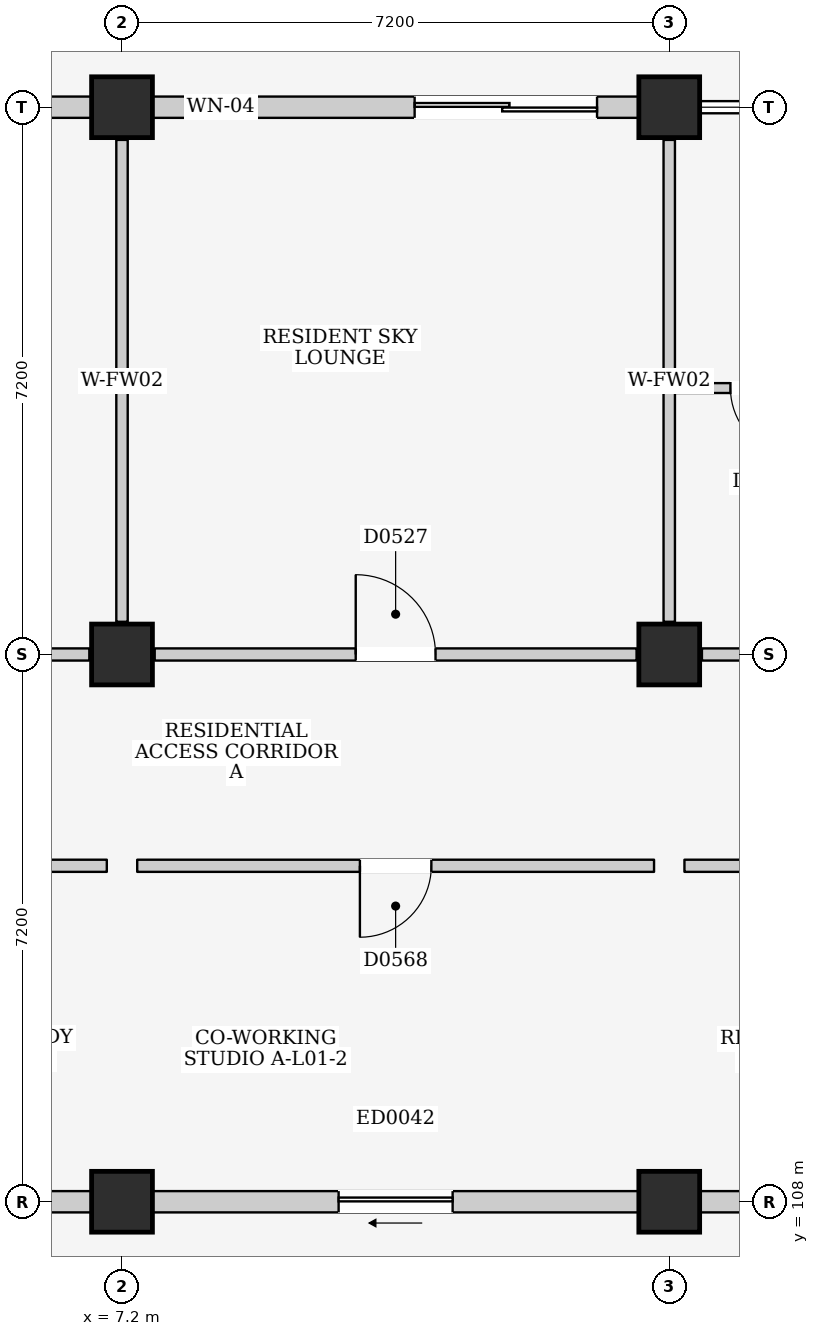
"""IFC4 building model, lengths in metres.
Left out: names, types, materials, properties, quantities, classifications, styles, units other than length and angle.
Written with IfcOpenShell. Run it as: python <this file> out.ifc"""

import sys

from ifc_helpers import new_model, si_unit, direction, frame, frame_2d, origin, origin_2d, place, context, subcontext, project, spatial, rectangle, extrude, element, fill, save


model = new_model("IFC4")
c1 = context("Model", 3, precision=1e-05, world=origin(), true_north=direction((0.0, 1.0)))
c2 = subcontext(c1, "Body", "Model", "MODEL_VIEW")
j1 = project(units=[si_unit("LENGTHUNIT", "METRE"), si_unit("PLANEANGLEUNIT", "RADIAN")], contexts=[c1])
p1 = place(None, origin())
s1 = spatial("IfcSite", under=j1, at=p1, CompositionType="ELEMENT")
p2 = place(p1, origin())
s2 = spatial("IfcBuilding", under=s1, at=p2, CompositionType="ELEMENT")
p3 = place(p2, frame((0.0, 0.0, 4.5)))
s3 = spatial("IfcBuildingStorey", under=s2, at=p3, CompositionType="ELEMENT", Elevation=4.5)
for number, where, z_axis, x_axis in (
    (1, (7.2, 108.0, 0.0), (0.0, 0.0, 1.0), (1.0, 0.0, 0.0)),
    (2, (7.2, 115.2, 0.0), (0.0, 0.0, 1.0), (1.0, 0.0, 0.0)),
    (3, (7.2, 122.4, 0.0), (0.0, 0.0, 1.0), (1.0, 0.0, 0.0)),
    (4, (14.4, 108.0, 0.0), (0.0, 0.0, 1.0), (1.0, 0.0, 0.0)),
    (5, (14.4, 115.2, 0.0), (0.0, 0.0, 1.0), (1.0, 0.0, 0.0)),
    (6, (14.4, 122.4, 0.0), (0.0, 0.0, 1.0), (1.0, 0.0, 0.0)),
):
    element("IfcColumn", number, at=place(p3, frame(where, z_axis=z_axis, x_axis=x_axis)), inside=s3, PredefinedType="COLUMN", context=c2, shape_type="SweptSolid", body=[
        extrude(rectangle(XDim=0.8, YDim=0.8, at=origin_2d()), origin(), (0.0, 0.0, 1.0), 4.5),
    ])
p4 = place(p3, frame((0.4, 122.4, 0.0), z_axis=(0.0, 0.0, 1.0), x_axis=(1.0, 0.0, 0.0)))
e7 = element("IfcWall", 7, at=p4, inside=s3, PredefinedType="ELEMENTEDWALL", context=c2, shape_type="SweptSolid", body=[
    extrude(rectangle(XDim=6.4, YDim=0.28, at=frame_2d((3.2, 0.0))), origin(), (0.0, 0.0, 1.0), 3.715),
])
p5 = place(p4, frame((4.35, 0.0, 0.0)))
e8 = element("IfcOpeningElement", 8, at=p5, cuts=e7, PredefinedType="OPENING", context=c2, shape_type="SweptSolid", body=[
    extrude(rectangle(XDim=1.5, YDim=2.12, at=frame_2d((0.75, 1.06))), frame((0.0, 0.155, 0.0), z_axis=(0.0, -1.0, 0.0), x_axis=(1.0, 0.0, 0.0)), (0.0, 0.0, 1.0), 0.31),
])
p6 = place(p4, frame((0.45, 0.0, 0.9)))
e9 = element("IfcOpeningElement", 9, at=p6, cuts=e7, PredefinedType="OPENING", context=c2, shape_type="SweptSolid", body=[
    extrude(rectangle(XDim=1.2, YDim=1.35, at=frame_2d((0.6, 0.675))), frame((0.0, 0.155, 0.0), z_axis=(0.0, -1.0, 0.0), x_axis=(1.0, 0.0, 0.0)), (0.0, 0.0, 1.0), 0.31),
])
p7 = place(p3, frame((0.4, 108.0, 0.0), z_axis=(0.0, 0.0, 1.0), x_axis=(1.0, 0.0, 0.0)))
e10 = element("IfcWall", 10, at=p7, inside=s3, PredefinedType="ELEMENTEDWALL", context=c2, shape_type="SweptSolid", body=[
    extrude(rectangle(XDim=6.4, YDim=0.28, at=frame_2d((3.2, 0.0))), origin(), (0.0, 0.0, 1.0), 3.585),
])
p8 = place(p7, frame((2.45, 0.0, 0.0)))
e11 = element("IfcOpeningElement", 11, at=p8, cuts=e10, PredefinedType="OPENING", context=c2, shape_type="SweptSolid", body=[
    extrude(rectangle(XDim=1.5, YDim=2.12, at=frame_2d((0.75, 1.06))), frame((0.0, 0.155, 0.0), z_axis=(0.0, -1.0, 0.0), x_axis=(1.0, 0.0, 0.0)), (0.0, 0.0, 1.0), 0.31),
])
p9 = place(p3, frame((7.6, 122.4, 0.0), z_axis=(0.0, 0.0, 1.0), x_axis=(1.0, 0.0, 0.0)))
e12 = element("IfcWall", 12, at=p9, inside=s3, PredefinedType="ELEMENTEDWALL", context=c2, shape_type="SweptSolid", body=[
    extrude(rectangle(XDim=6.4, YDim=0.28, at=frame_2d((3.2, 0.0))), origin(), (0.0, 0.0, 1.0), 3.715),
])
p10 = place(p9, frame((3.45, 0.0, 0.0)))
e13 = element("IfcOpeningElement", 13, at=p10, cuts=e12, PredefinedType="OPENING", context=c2, shape_type="SweptSolid", body=[
    extrude(rectangle(XDim=2.4, YDim=2.12, at=frame_2d((1.2, 1.06))), frame((0.0, 0.155, 0.0), z_axis=(0.0, -1.0, 0.0), x_axis=(1.0, 0.0, 0.0)), (0.0, 0.0, 1.0), 0.31),
])
p11 = place(p9, frame((0.45, 0.0, 0.9)))
e14 = element("IfcOpeningElement", 14, at=p11, cuts=e12, PredefinedType="OPENING", context=c2, shape_type="SweptSolid", body=[
    extrude(rectangle(XDim=0.9, YDim=1.1, at=frame_2d((0.45, 0.55))), frame((0.0, 0.155, 0.0), z_axis=(0.0, -1.0, 0.0), x_axis=(1.0, 0.0, 0.0)), (0.0, 0.0, 1.0), 0.31),
])
p12 = place(p3, frame((7.6, 108.0, 0.0), z_axis=(0.0, 0.0, 1.0), x_axis=(1.0, 0.0, 0.0)))
e15 = element("IfcWall", 15, at=p12, inside=s3, PredefinedType="ELEMENTEDWALL", context=c2, shape_type="SweptSolid", body=[
    extrude(rectangle(XDim=6.4, YDim=0.28, at=frame_2d((3.2, 0.0))), origin(), (0.0, 0.0, 1.0), 3.585),
])
p13 = place(p12, frame((2.45, 0.0, 0.0)))
e16 = element("IfcOpeningElement", 16, at=p13, cuts=e15, PredefinedType="OPENING", context=c2, shape_type="SweptSolid", body=[
    extrude(rectangle(XDim=1.5, YDim=2.12, at=frame_2d((0.75, 1.06))), frame((0.0, 0.155, 0.0), z_axis=(0.0, -1.0, 0.0), x_axis=(1.0, 0.0, 0.0)), (0.0, 0.0, 1.0), 0.31),
])
p14 = place(p3, frame((14.8, 108.0, 0.0), z_axis=(0.0, 0.0, 1.0), x_axis=(1.0, 0.0, 0.0)))
e17 = element("IfcWall", 17, at=p14, inside=s3, PredefinedType="ELEMENTEDWALL", context=c2, shape_type="SweptSolid", body=[
    extrude(rectangle(XDim=6.4, YDim=0.28, at=frame_2d((3.2, 0.0))), origin(), (0.0, 0.0, 1.0), 3.585),
])
p15 = place(p14, frame((2.45, 0.0, 0.0)))
e18 = element("IfcOpeningElement", 18, at=p15, cuts=e17, PredefinedType="OPENING", context=c2, shape_type="SweptSolid", body=[
    extrude(rectangle(XDim=1.5, YDim=2.12, at=frame_2d((0.75, 1.06))), frame((0.0, 0.155, 0.0), z_axis=(0.0, -1.0, 0.0), x_axis=(1.0, 0.0, 0.0)), (0.0, 0.0, 1.0), 0.31),
])
p16 = place(p3, frame((0.43, 115.2, 0.0), z_axis=(0.0, 0.0, 1.0), x_axis=(1.0, 0.0, 0.0)))
e19 = element("IfcWall", 19, at=p16, inside=s3, PredefinedType="PARTITIONING", context=c2, shape_type="SweptSolid", body=[
    extrude(rectangle(XDim=6.34, YDim=0.16, at=frame_2d((3.17, 0.0))), origin(), (0.0, 0.0, 1.0), 3.585),
])
p17 = place(p16, frame((2.67, 0.0, 0.0)))
e20 = element("IfcOpeningElement", 20, at=p17, cuts=e19, PredefinedType="OPENING", context=c2, shape_type="SweptSolid", body=[
    extrude(rectangle(XDim=1.0, YDim=2.15, at=frame_2d((0.5, 1.075))), frame((0.0, 0.095, 0.0), z_axis=(0.0, -1.0, 0.0), x_axis=(1.0, 0.0, 0.0)), (0.0, 0.0, 1.0), 0.19),
])
p18 = place(p3, frame((7.2, 115.63, 0.0), z_axis=(0.0, 0.0, 1.0), x_axis=(0.0, 1.0, 0.0)))
e21 = element("IfcWall", 21, at=p18, inside=s3, PredefinedType="PARTITIONING", context=c2, shape_type="SweptSolid", body=[
    extrude(rectangle(XDim=6.34, YDim=0.15, at=frame_2d((3.17, 0.0))), origin(), (0.0, 0.0, 1.0), 3.685),
])
p19 = place(p3, frame((7.63, 115.2, 0.0), z_axis=(0.0, 0.0, 1.0), x_axis=(1.0, 0.0, 0.0)))
e22 = element("IfcWall", 22, at=p19, inside=s3, PredefinedType="PARTITIONING", context=c2, shape_type="SweptSolid", body=[
    extrude(rectangle(XDim=6.34, YDim=0.16, at=frame_2d((3.17, 0.0))), origin(), (0.0, 0.0, 1.0), 3.585),
])
p20 = place(p19, frame((2.645, 0.0, 0.0)))
e23 = element("IfcOpeningElement", 23, at=p20, cuts=e22, PredefinedType="OPENING", context=c2, shape_type="SweptSolid", body=[
    extrude(rectangle(XDim=1.05, YDim=2.2, at=frame_2d((0.525, 1.1))), frame((0.0, 0.095, 0.0), z_axis=(0.0, -1.0, 0.0), x_axis=(1.0, 0.0, 0.0)), (0.0, 0.0, 1.0), 0.19),
])
p21 = place(p3, frame((14.4, 115.63, 0.0), z_axis=(0.0, 0.0, 1.0), x_axis=(0.0, 1.0, 0.0)))
e24 = element("IfcWall", 24, at=p21, inside=s3, PredefinedType="PARTITIONING", context=c2, shape_type="SweptSolid", body=[
    extrude(rectangle(XDim=6.34, YDim=0.15, at=frame_2d((3.17, 0.0))), origin(), (0.0, 0.0, 1.0), 3.685),
])
p22 = place(p3, frame((14.83, 115.2, 0.0), z_axis=(0.0, 0.0, 1.0), x_axis=(1.0, 0.0, 0.0)))
e25 = element("IfcWall", 25, at=p22, inside=s3, PredefinedType="PARTITIONING", context=c2, shape_type="SweptSolid", body=[
    extrude(rectangle(XDim=6.34, YDim=0.16, at=frame_2d((3.17, 0.0))), origin(), (0.0, 0.0, 1.0), 3.585),
])
p23 = place(p22, frame((5.16, 0.0, 0.0)))
e26 = element("IfcOpeningElement", 26, at=p23, cuts=e25, PredefinedType="OPENING", context=c2, shape_type="SweptSolid", body=[
    extrude(rectangle(XDim=1.0, YDim=2.15, at=frame_2d((0.5, 1.075))), frame((0.0, 0.095, 0.0), z_axis=(0.0, -1.0, 0.0), x_axis=(1.0, 0.0, 0.0)), (0.0, 0.0, 1.0), 0.19),
])
p24 = place(p3, frame((14.48, 118.705, 0.0), z_axis=(0.0, 0.0, 1.0), x_axis=(1.0, 0.0, 0.0)))
e27 = element("IfcWall", 27, at=p24, inside=s3, PredefinedType="PARTITIONING", context=c2, shape_type="SweptSolid", body=[
    extrude(rectangle(XDim=2.35, YDim=0.13, at=frame_2d((1.175, 0.0))), origin(), (0.0, 0.0, 1.0), 4.25),
])
p25 = place(p24, frame((0.725, 0.0, 0.0)))
e28 = element("IfcOpeningElement", 28, at=p25, cuts=e27, PredefinedType="OPENING", context=c2, shape_type="SweptSolid", body=[
    extrude(rectangle(XDim=0.9, YDim=2.1, at=frame_2d((0.45, 1.05))), frame((0.0, 0.08, 0.0), z_axis=(0.0, -1.0, 0.0), x_axis=(1.0, 0.0, 0.0)), (0.0, 0.0, 1.0), 0.16),
])
p26 = place(p3, frame((0.28, 112.42, 0.0), z_axis=(0.0, 0.0, 1.0), x_axis=(1.0, 0.0, 0.0)))
e29 = element("IfcWall", 29, at=p26, inside=s3, PredefinedType="PARTITIONING", context=c2, shape_type="SweptSolid", body=[
    extrude(rectangle(XDim=6.72, YDim=0.16, at=frame_2d((3.36, 0.0))), origin(), (0.0, 0.0, 1.0), 4.25),
])
p27 = place(p26, frame((2.89, 0.0, 0.0)))
e30 = element("IfcOpeningElement", 30, at=p27, cuts=e29, PredefinedType="OPENING", context=c2, shape_type="SweptSolid", body=[
    extrude(rectangle(XDim=0.94, YDim=2.12, at=frame_2d((0.47, 1.06))), frame((0.0, 0.095, 0.0), z_axis=(0.0, -1.0, 0.0), x_axis=(1.0, 0.0, 0.0)), (0.0, 0.0, 1.0), 0.19),
])
p28 = place(p3, frame((7.4, 112.42, 0.0), z_axis=(0.0, 0.0, 1.0), x_axis=(1.0, 0.0, 0.0)))
e31 = element("IfcWall", 31, at=p28, inside=s3, PredefinedType="PARTITIONING", context=c2, shape_type="SweptSolid", body=[
    extrude(rectangle(XDim=6.8, YDim=0.16, at=frame_2d((3.4, 0.0))), origin(), (0.0, 0.0, 1.0), 4.25),
])
p29 = place(p28, frame((2.93, 0.0, 0.0)))
e32 = element("IfcOpeningElement", 32, at=p29, cuts=e31, PredefinedType="OPENING", context=c2, shape_type="SweptSolid", body=[
    extrude(rectangle(XDim=0.94, YDim=2.12, at=frame_2d((0.47, 1.06))), frame((0.0, 0.095, 0.0), z_axis=(0.0, -1.0, 0.0), x_axis=(1.0, 0.0, 0.0)), (0.0, 0.0, 1.0), 0.19),
])
p30 = place(p3, frame((14.6, 112.42, 0.0), z_axis=(0.0, 0.0, 1.0), x_axis=(1.0, 0.0, 0.0)))
e33 = element("IfcWall", 33, at=p30, inside=s3, PredefinedType="PARTITIONING", context=c2, shape_type="SweptSolid", body=[
    extrude(rectangle(XDim=6.8, YDim=0.16, at=frame_2d((3.4, 0.0))), origin(), (0.0, 0.0, 1.0), 4.25),
])
p31 = place(p30, frame((2.93, 0.0, 0.0)))
e34 = element("IfcOpeningElement", 34, at=p31, cuts=e33, PredefinedType="OPENING", context=c2, shape_type="SweptSolid", body=[
    extrude(rectangle(XDim=0.94, YDim=2.12, at=frame_2d((0.47, 1.06))), frame((0.0, 0.095, 0.0), z_axis=(0.0, -1.0, 0.0), x_axis=(1.0, 0.0, 0.0)), (0.0, 0.0, 1.0), 0.19),
])
p32 = place(p10, frame((2.4, 0.0, 0.0), z_axis=(0.0, 0.0, 1.0), x_axis=(-1.0, 0.0, 0.0)))
e35 = element("IfcDoor", 35, at=p32, inside=s3, OperationType="DOUBLE_DOOR_SLIDING", PredefinedType="DOOR", context=c2, shape_type="SweptSolid", body=[
    extrude(rectangle(XDim=2.4, YDim=2.12, at=frame_2d((1.2, 1.06))), frame((0.0, 0.025, 0.0), z_axis=(0.0, -1.0, 0.0), x_axis=(1.0, 0.0, 0.0)), (0.0, 0.0, 1.0), 0.05),
])
fill(e13, e35)
p33 = place(p11, origin())
e36 = element("IfcWindow", 36, at=p33, inside=s3, PartitioningType="SINGLE_PANEL", PredefinedType="WINDOW", context=c2, shape_type="SweptSolid", body=[
    extrude(rectangle(XDim=0.9, YDim=1.1, at=frame_2d((0.45, 0.55))), frame((0.0, 0.03, 0.0), z_axis=(0.0, -1.0, 0.0), x_axis=(1.0, 0.0, 0.0)), (0.0, 0.0, 1.0), 0.06),
])
fill(e14, e36)
p34 = place(p13, frame((1.5, 0.0, 0.0), z_axis=(0.0, 0.0, 1.0), x_axis=(-1.0, 0.0, 0.0)))
e37 = element("IfcDoor", 37, at=p34, inside=s3, OperationType="SLIDING_TO_LEFT", PredefinedType="DOOR", context=c2, shape_type="SweptSolid", body=[
    extrude(rectangle(XDim=1.5, YDim=2.12, at=frame_2d((0.75, 1.06))), frame((0.0, 0.025, 0.0), z_axis=(0.0, -1.0, 0.0), x_axis=(1.0, 0.0, 0.0)), (0.0, 0.0, 1.0), 0.05),
])
fill(e16, e37)
p35 = place(p20, origin())
e38 = element("IfcDoor", 38, at=p35, inside=s3, OperationType="SINGLE_SWING_LEFT", PredefinedType="DOOR", context=c2, shape_type="SweptSolid", body=[
    extrude(rectangle(XDim=1.05, YDim=2.2, at=frame_2d((0.525, 1.1))), frame((0.0, 0.025, 0.0), z_axis=(0.0, -1.0, 0.0), x_axis=(1.0, 0.0, 0.0)), (0.0, 0.0, 1.0), 0.05),
])
fill(e23, e38)
p36 = place(p25, frame((0.9, 0.0, 0.0), z_axis=(0.0, 0.0, 1.0), x_axis=(-1.0, 0.0, 0.0)))
e39 = element("IfcDoor", 39, at=p36, inside=s3, OperationType="SINGLE_SWING_LEFT", PredefinedType="DOOR", context=c2, shape_type="SweptSolid", body=[
    extrude(rectangle(XDim=0.9, YDim=2.1, at=frame_2d((0.45, 1.05))), frame((0.0, 0.025, 0.0), z_axis=(0.0, -1.0, 0.0), x_axis=(1.0, 0.0, 0.0)), (0.0, 0.0, 1.0), 0.05),
])
fill(e28, e39)
p37 = place(p29, frame((0.94, 0.0, 0.0), z_axis=(0.0, 0.0, 1.0), x_axis=(-1.0, 0.0, 0.0)))
e40 = element("IfcDoor", 40, at=p37, inside=s3, OperationType="SINGLE_SWING_RIGHT", PredefinedType="DOOR", context=c2, shape_type="SweptSolid", body=[
    extrude(rectangle(XDim=0.94, YDim=2.12, at=frame_2d((0.47, 1.06))), frame((0.0, 0.025, 0.0), z_axis=(0.0, -1.0, 0.0), x_axis=(1.0, 0.0, 0.0)), (0.0, 0.0, 1.0), 0.05),
])
fill(e32, e40)
save(model, sys.argv[1])
